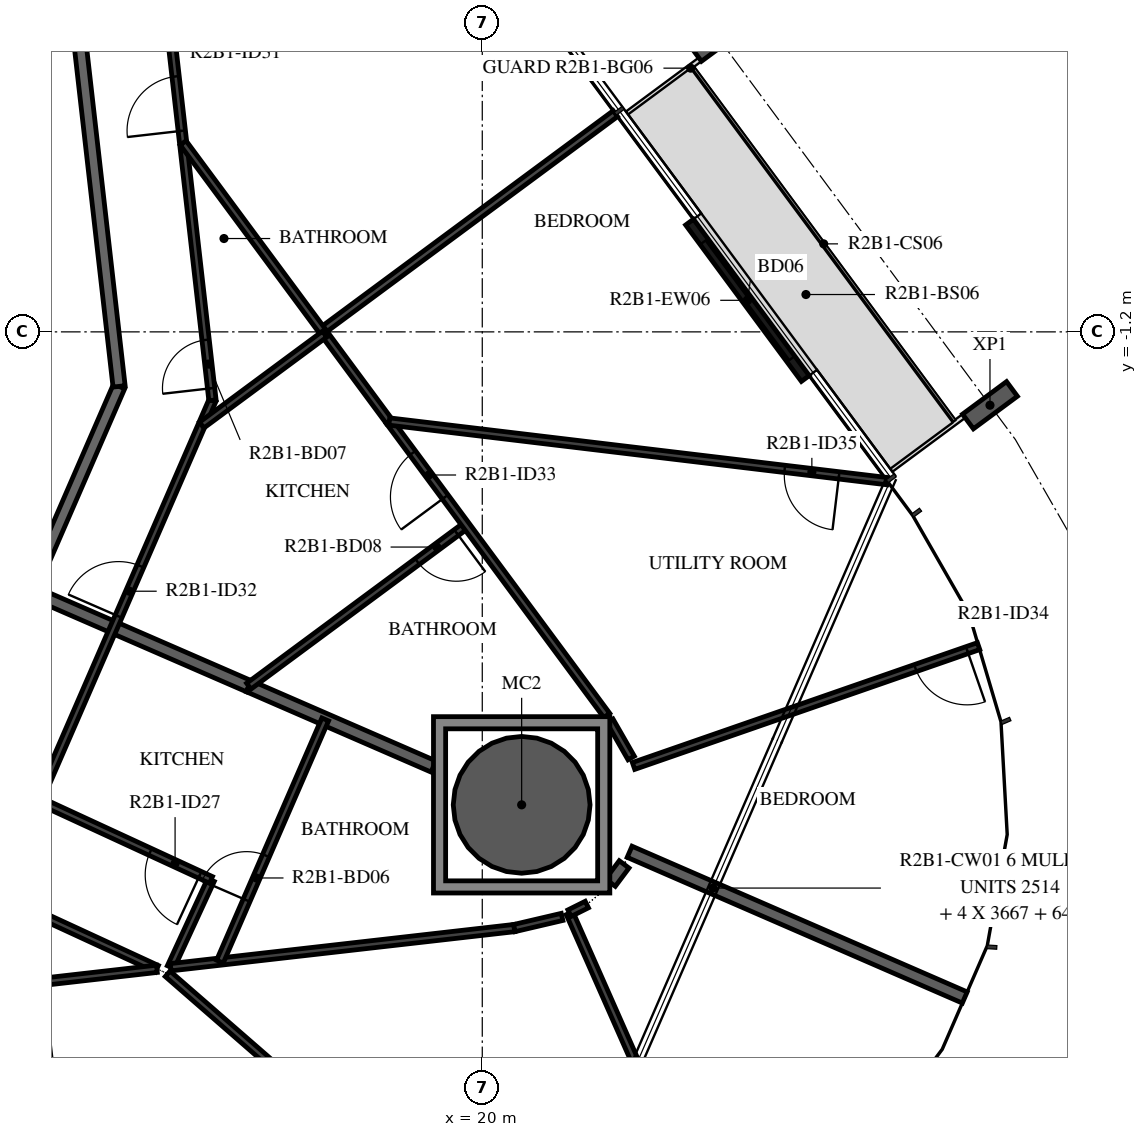
"""IFC4 building model, lengths in metres.
Left out: names, types, materials, properties, quantities, classifications, styles, units other than length and angle.
Written with IfcOpenShell. Run it as: python <this file> out.ifc"""

import sys

from ifc_helpers import new_model, si_unit, direction, frame, frame_2d, origin, origin_2d, place, context, subcontext, project, spatial, polyline, rectangle, hollow_circle, i_section, outline, extrude, element, fill, save


model = new_model("IFC4")
c1 = context("Model", 3, precision=1e-05, world=origin(), true_north=direction((0.0, 1.0)))
c2 = subcontext(c1, "Body", "Model", "MODEL_VIEW")
j1 = project(units=[si_unit("LENGTHUNIT", "METRE"), si_unit("PLANEANGLEUNIT", "RADIAN")], contexts=[c1])
p1 = place(None, origin())
s1 = spatial("IfcSite", under=j1, at=p1, CompositionType="ELEMENT")
p2 = place(p1, origin())
s2 = spatial("IfcBuilding", under=s1, at=p2, CompositionType="ELEMENT")
p3 = place(p2, frame((0.0, 0.0, 87.2)))
s3 = spatial("IfcBuildingStorey", under=s2, at=p3, CompositionType="ELEMENT", Elevation=87.2)
p4 = place(p3, frame((20.648, -8.978, -0.38), z_axis=(0.0, 0.0, 1.0), x_axis=(1.0, 0.0, 0.0)))
e1 = element("IfcColumn", 1, at=p4, inside=s3, PredefinedType="COLUMN", context=c2, shape_type="SweptSolid", body=[
    extrude(hollow_circle(Radius=1.125, WallThickness=0.055, at=origin_2d()), origin(), (0.0, 0.0, 1.0), 3.5),
])
for number, where, z_axis, x_axis in (
    (2, (28.349, -2.406, -0.38), (0.0, 0.0, 1.0), (0.595, -0.804, 0.0)),
    (3, (23.877, 3.638, -0.38), (0.0, 0.0, 1.0), (0.595, -0.804, 0.0)),
):
    element("IfcColumn", number, at=place(p3, frame(where, z_axis=z_axis, x_axis=x_axis)), inside=s3, PredefinedType="COLUMN", context=c2, shape_type="SweptSolid", body=[
        extrude(i_section(OverallWidth=0.3, OverallDepth=0.9, WebThickness=0.019, FlangeThickness=0.035, FilletRadius=0.03, at=origin_2d()), origin(), (0.0, 0.0, 1.0), 3.5),
    ])
p5 = place(p3, frame((25.312, -1.967, 0.0), z_axis=(0.0, 0.0, 1.0), x_axis=(-0.594860752536, 0.803828766027, 0.0)))
e4 = element("IfcWall", 4, at=p5, inside=s3, PredefinedType="STANDARD", context=c2, shape_type="SweptSolid", body=[
    extrude(rectangle(XDim=3.2, YDim=0.16, at=frame_2d((1.6, 0.0))), origin(), (0.0, 0.0, 1.0), 3.12),
])
p6 = place(p5, frame((0.4, 0.0, 0.0)))
e5 = element("IfcOpeningElement", 5, at=p6, cuts=e4, PredefinedType="OPENING", context=c2, shape_type="SweptSolid", body=[
    extrude(rectangle(XDim=2.4, YDim=2.4, at=frame_2d((1.2, 1.2))), frame((0.0, 0.09, 0.0), z_axis=(0.0, -1.0, 0.0), x_axis=(1.0, 0.0, 0.0)), (0.0, 0.0, 1.0), 0.18),
])
p7 = place(p3, frame((11.1, -8.829, 0.0), z_axis=(0.0, 0.0, 1.0), x_axis=(0.398741918631, 0.917063183388, 0.0)))
e6 = element("IfcWall", 6, at=p7, inside=s3, PredefinedType="STANDARD", context=c2, shape_type="SweptSolid", body=[
    extrude(rectangle(XDim=7.342, YDim=0.2, at=frame_2d((3.671, 0.0))), origin(), (0.0, 0.0, 1.0), 3.12),
])
p8 = place(p3, frame((14.028, -2.096, 0.0), z_axis=(0.0, 0.0, 1.0), x_axis=(-0.113207047924, 0.993571418822, 0.0)))
e7 = element("IfcWall", 7, at=p8, inside=s3, PredefinedType="STANDARD", context=c2, shape_type="SweptSolid", body=[
    extrude(rectangle(XDim=7.24, YDim=0.2, at=frame_2d((3.62, 0.0))), origin(), (0.0, 0.0, 1.0), 3.12),
])
p9 = place(p8, frame((6.04, 0.0, 0.0)))
e8 = element("IfcOpeningElement", 8, at=p9, cuts=e7, PredefinedType="OPENING", context=c2, shape_type="SweptSolid", body=[
    extrude(rectangle(XDim=1.0, YDim=2.1, at=frame_2d((0.5, 1.05))), frame((0.0, 0.11, 0.0), z_axis=(0.0, -1.0, 0.0), x_axis=(1.0, 0.0, 0.0)), (0.0, 0.0, 1.0), 0.22),
])
p10 = place(p3, frame((16.16, -7.027, 0.0), z_axis=(0.0, 0.0, 1.0), x_axis=(-0.917065107526, 0.398737493293, 0.0)))
e9 = element("IfcWall", 9, at=p10, inside=s3, PredefinedType="STANDARD", context=c2, shape_type="SweptSolid", body=[
    extrude(rectangle(XDim=3.922, YDim=0.2, at=frame_2d((1.961, 0.0))), origin(), (0.0, 0.0, 1.0), 3.12),
])
p11 = place(p3, frame((19.198, -8.347, 0.0), z_axis=(0.0, 0.0, 1.0), x_axis=(-0.917046616943, 0.398780017495, 0.0)))
e10 = element("IfcWall", 10, at=p11, inside=s3, PredefinedType="STANDARD", context=c2, shape_type="SweptSolid", body=[
    extrude(rectangle(XDim=3.312, YDim=0.2, at=frame_2d((1.656, 0.0))), origin(), (0.0, 0.0, 1.0), 3.12),
])
p12 = place(p3, frame((27.935, -12.146, 0.0), z_axis=(0.0, 0.0, 1.0), x_axis=(-0.917058430913, 0.398752848631, 0.0)))
e11 = element("IfcWall", 11, at=p12, inside=s3, PredefinedType="STANDARD", context=c2, shape_type="SweptSolid", body=[
    extrude(rectangle(XDim=6.01, YDim=0.2, at=frame_2d((3.005, 0.0))), origin(), (0.0, 0.0, 1.0), 3.12),
])
p13 = place(p3, frame((22.333, -9.957, 0.0), z_axis=(0.0, 0.0, 1.0), x_axis=(-0.599479717237, -0.800389947851, 0.0)))
e12 = element("IfcWall", 12, at=p13, inside=s3, PredefinedType="STANDARD", context=c2, shape_type="SweptSolid", body=[
    extrude(rectangle(XDim=0.375, YDim=0.2, at=frame_2d((0.188, 0.0))), origin(), (0.0, 0.0, 1.0), 3.12),
])
p14 = place(p3, frame((11.649, -10.289, 0.0), z_axis=(0.0, 0.0, 1.0), x_axis=(0.9079269461, -0.419128453514, 0.0)))
e13 = element("IfcWall", 13, at=p14, inside=s3, PredefinedType="PARTITIONING", context=c2, shape_type="SweptSolid", body=[
    extrude(rectangle(XDim=3.304, YDim=0.12, at=frame_2d((1.652, 0.0))), origin(), (0.0, 0.0, 1.0), 3.12),
])
p15 = place(p3, frame((14.875, -11.648, 0.0), z_axis=(0.0, 0.0, 1.0), x_axis=(0.419087543301, 0.90794583046, 0.0)))
e14 = element("IfcWall", 14, at=p15, inside=s3, PredefinedType="PARTITIONING", context=c2, shape_type="SweptSolid", body=[
    extrude(rectangle(XDim=1.582, YDim=0.12, at=frame_2d((0.791, 0.0))), origin(), (0.0, 0.0, 1.0), 3.12),
])
p16 = place(p3, frame((15.538, -10.212, 0.0), z_axis=(0.0, 0.0, 1.0), x_axis=(-0.907941075756, 0.419097844131, 0.0)))
e15 = element("IfcWall", 15, at=p16, inside=s3, PredefinedType="PARTITIONING", context=c2, shape_type="SweptSolid", body=[
    extrude(rectangle(XDim=3.122, YDim=0.12, at=frame_2d((1.561, 0.0))), origin(), (0.0, 0.0, 1.0), 3.12),
])
p17 = place(p16, frame((0.2, 0.0, 0.0)))
e16 = element("IfcOpeningElement", 16, at=p17, cuts=e15, PredefinedType="OPENING", context=c2, shape_type="SweptSolid", body=[
    extrude(rectangle(XDim=0.9, YDim=2.1, at=frame_2d((0.45, 1.05))), frame((0.0, 0.07, 0.0), z_axis=(0.0, -1.0, 0.0), x_axis=(1.0, 0.0, 0.0)), (0.0, 0.0, 1.0), 0.14),
])
p18 = place(p3, frame((12.703, -8.904, 0.0), z_axis=(0.0, 0.0, 1.0), x_axis=(0.398716154453, 0.917074385303, 0.0)))
e17 = element("IfcWall", 17, at=p18, inside=s3, PredefinedType="PARTITIONING", context=c2, shape_type="SweptSolid", body=[
    extrude(rectangle(XDim=7.173, YDim=0.12, at=frame_2d((3.586, 0.0))), origin(), (0.0, 0.0, 1.0), 3.12),
])
p19 = place(p18, frame((3.3, 0.0, 0.0)))
e18 = element("IfcOpeningElement", 18, at=p19, cuts=e17, PredefinedType="OPENING", context=c2, shape_type="SweptSolid", body=[
    extrude(rectangle(XDim=0.9, YDim=2.1, at=frame_2d((0.45, 1.05))), frame((0.0, 0.07, 0.0), z_axis=(0.0, -1.0, 0.0), x_axis=(1.0, 0.0, 0.0)), (0.0, 0.0, 1.0), 0.14),
])
p20 = place(p3, frame((14.649, -11.674, 0.0), z_axis=(0.0, 0.0, 1.0), x_axis=(-0.993573746873, -0.113186613721, 0.0)))
e19 = element("IfcWall", 19, at=p20, inside=s3, PredefinedType="PARTITIONING", context=c2, shape_type="SweptSolid", body=[
    extrude(rectangle(XDim=5.796, YDim=0.12, at=frame_2d((2.898, 0.0))), origin(), (0.0, 0.0, 1.0), 3.12),
])
p21 = place(p3, frame((13.386, -17.857, 0.0), z_axis=(0.0, 0.0, 1.0), x_axis=(-0.113200012983, 0.993572220355, 0.0)))
e20 = element("IfcWall", 20, at=p21, inside=s3, PredefinedType="PARTITIONING", context=c2, shape_type="SweptSolid", body=[
    extrude(rectangle(XDim=6.0, YDim=0.12, at=frame_2d((3.0, 0.0))), origin(), (0.0, 0.0, 1.0), 2.73),
])
p22 = place(p21, frame((0.2, 0.0, 0.0)))
e21 = element("IfcOpeningElement", 21, at=p22, cuts=e20, PredefinedType="OPENING", context=c2, shape_type="SweptSolid", body=[
    extrude(rectangle(XDim=0.9, YDim=2.1, at=frame_2d((0.45, 1.05))), frame((0.0, 0.07, 0.0), z_axis=(0.0, -1.0, 0.0), x_axis=(1.0, 0.0, 0.0)), (0.0, 0.0, 1.0), 0.14),
])
p23 = place(p3, frame((20.856, -17.006, 0.0), z_axis=(0.0, 0.0, 1.0), x_axis=(-0.75423134567, 0.656608770281, 0.0)))
e22 = element("IfcWall", 22, at=p23, inside=s3, PredefinedType="PARTITIONING", context=c2, shape_type="SweptSolid", body=[
    extrude(rectangle(XDim=7.995, YDim=0.12, at=frame_2d((3.998, 0.0))), origin(), (0.0, 0.0, 1.0), 3.12),
])
p24 = place(p23, frame((0.7, 0.0, 0.0)))
e23 = element("IfcOpeningElement", 23, at=p24, cuts=e22, PredefinedType="OPENING", context=c2, shape_type="SweptSolid", body=[
    extrude(rectangle(XDim=0.9, YDim=2.1, at=frame_2d((0.45, 1.05))), frame((0.0, 0.07, 0.0), z_axis=(0.0, -1.0, 0.0), x_axis=(1.0, 0.0, 0.0)), (0.0, 0.0, 1.0), 0.14),
])
p25 = place(p3, frame((20.527, -11.004, 0.0), z_axis=(0.0, 0.0, 1.0), x_axis=(-0.993568869194, -0.113229422712, 0.0)))
e24 = element("IfcWall", 24, at=p25, inside=s3, PredefinedType="PARTITIONING", context=c2, shape_type="SweptSolid", body=[
    extrude(rectangle(XDim=5.688, YDim=0.12, at=frame_2d((2.844, 0.0))), origin(), (0.0, 0.0, 1.0), 3.12),
])
p26 = place(p3, frame((21.312, -10.821, 0.0), z_axis=(0.0, 0.0, 1.0), x_axis=(-0.973765266404, -0.227554841621, 0.0)))
e25 = element("IfcWall", 25, at=p26, inside=s3, PredefinedType="PARTITIONING", context=c2, shape_type="SweptSolid", body=[
    extrude(rectangle(XDim=0.807, YDim=0.12, at=frame_2d((0.403, 0.0))), origin(), (0.0, 0.0, 1.0), 3.12),
])
p27 = place(p3, frame((23.864, -16.253, 0.0), z_axis=(0.0, 0.0, 1.0), x_axis=(-0.404274566917, 0.914637673915, 0.0)))
e26 = element("IfcWall", 26, at=p27, inside=s3, PredefinedType="PARTITIONING", context=c2, shape_type="SweptSolid", body=[
    extrude(rectangle(XDim=6.006, YDim=0.12, at=frame_2d((3.003, 0.0))), origin(), (0.0, 0.0, 1.0), 3.12),
])
p28 = place(p27, frame((0.2, 0.0, 0.0)))
e27 = element("IfcOpeningElement", 27, at=p28, cuts=e26, PredefinedType="OPENING", context=c2, shape_type="SweptSolid", body=[
    extrude(rectangle(XDim=0.9, YDim=2.1, at=frame_2d((0.45, 1.05))), frame((0.0, 0.07, 0.0), z_axis=(0.0, -1.0, 0.0), x_axis=(1.0, 0.0, 0.0)), (0.0, 0.0, 1.0), 0.14),
])
p29 = place(p3, frame((15.686, -11.556, 0.0), z_axis=(0.0, 0.0, 1.0), x_axis=(0.398724055903, 0.917070949951, 0.0)))
e28 = element("IfcWall", 28, at=p29, inside=s3, PredefinedType="PARTITIONING", context=c2, shape_type="SweptSolid", body=[
    extrude(rectangle(XDim=4.343, YDim=0.12, at=frame_2d((2.171, 0.0))), origin(), (0.0, 0.0, 1.0), 3.12),
])
p30 = place(p29, frame((1.1, 0.0, 0.0)))
e29 = element("IfcOpeningElement", 29, at=p30, cuts=e28, PredefinedType="OPENING", context=c2, shape_type="SweptSolid", body=[
    extrude(rectangle(XDim=0.8, YDim=2.1, at=frame_2d((0.4, 1.05))), frame((0.0, 0.07, 0.0), z_axis=(0.0, -1.0, 0.0), x_axis=(1.0, 0.0, 0.0)), (0.0, 0.0, 1.0), 0.14),
])
p31 = place(p3, frame((21.435, -10.76, 0.0), z_axis=(0.0, 0.0, 1.0), x_axis=(0.895041493646, 0.445982874841, 0.0)))
e30 = element("IfcWall", 30, at=p31, inside=s3, PredefinedType="PARTITIONING", context=c2, shape_type="SweptSolid", body=[
    extrude(rectangle(XDim=0.317, YDim=0.12, at=frame_2d((0.159, 0.0))), origin(), (0.0, 0.0, 1.0), 3.12),
])
p32 = place(p3, frame((15.563, -2.326, 0.0), z_axis=(0.0, 0.0, 1.0), x_axis=(-0.113209750844, 0.993571110849, 0.0)))
e31 = element("IfcWall", 31, at=p32, inside=s3, PredefinedType="PARTITIONING", context=c2, shape_type="SweptSolid", body=[
    extrude(rectangle(XDim=6.828, YDim=0.12, at=frame_2d((3.414, 0.0))), origin(), (0.0, 0.0, 1.0), 3.12),
])
p33 = place(p32, frame((4.461, 0.0, 0.0)))
e32 = element("IfcOpeningElement", 32, at=p33, cuts=e31, PredefinedType="OPENING", context=c2, shape_type="SweptSolid", body=[
    extrude(rectangle(XDim=0.9, YDim=2.1, at=frame_2d((0.45, 1.05))), frame((0.0, 0.07, 0.0), z_axis=(0.0, -1.0, 0.0), x_axis=(1.0, 0.0, 0.0)), (0.0, 0.0, 1.0), 0.14),
])
p34 = place(p32, frame((0.2, 0.0, 0.0)))
e33 = element("IfcOpeningElement", 33, at=p34, cuts=e31, PredefinedType="OPENING", context=c2, shape_type="SweptSolid", body=[
    extrude(rectangle(XDim=0.8, YDim=2.1, at=frame_2d((0.4, 1.05))), frame((0.0, 0.07, 0.0), z_axis=(0.0, -1.0, 0.0), x_axis=(1.0, 0.0, 0.0)), (0.0, 0.0, 1.0), 0.14),
])
p35 = place(p3, frame((17.366, -1.18, 0.0), z_axis=(0.0, 0.0, 1.0), x_axis=(0.803855518832, 0.594824600065, 0.0)))
e34 = element("IfcWall", 34, at=p35, inside=s3, PredefinedType="PARTITIONING", context=c2, shape_type="SweptSolid", body=[
    extrude(rectangle(XDim=6.0, YDim=0.12, at=frame_2d((3.0, 0.0))), origin(), (0.0, 0.0, 1.0), 2.73),
])
p36 = place(p3, frame((15.081, 1.907, 0.0), z_axis=(0.0, 0.0, 1.0), x_axis=(0.594819754849, -0.803859104098, 0.0)))
e35 = element("IfcWall", 35, at=p36, inside=s3, PredefinedType="PARTITIONING", context=c2, shape_type="SweptSolid", body=[
    extrude(rectangle(XDim=5.699, YDim=0.12, at=frame_2d((2.85, 0.0))), origin(), (0.0, 0.0, 1.0), 3.12),
])
p37 = place(p3, frame((28.162, -6.368, 0.0), z_axis=(0.0, 0.0, 1.0), x_axis=(-0.944645847702, -0.328091789624, 0.0)))
e36 = element("IfcWall", 36, at=p37, inside=s3, PredefinedType="PARTITIONING", context=c2, shape_type="SweptSolid", body=[
    extrude(rectangle(XDim=6.007, YDim=0.12, at=frame_2d((3.003, 0.0))), origin(), (0.0, 0.0, 1.0), 3.12),
])
p38 = place(p37, frame((0.2, 0.0, 0.0)))
e37 = element("IfcOpeningElement", 37, at=p38, cuts=e36, PredefinedType="OPENING", context=c2, shape_type="SweptSolid", body=[
    extrude(rectangle(XDim=0.9, YDim=2.1, at=frame_2d((0.45, 1.05))), frame((0.0, 0.07, 0.0), z_axis=(0.0, -1.0, 0.0), x_axis=(1.0, 0.0, 0.0)), (0.0, 0.0, 1.0), 0.14),
])
p39 = place(p3, frame((22.449, -8.207, 0.0), z_axis=(0.0, 0.0, 1.0), x_axis=(-0.497404938529, 0.867518488061, 0.0)))
e38 = element("IfcWall", 38, at=p39, inside=s3, PredefinedType="PARTITIONING", context=c2, shape_type="SweptSolid", body=[
    extrude(rectangle(XDim=0.706, YDim=0.12, at=frame_2d((0.353, 0.0))), origin(), (0.0, 0.0, 1.0), 3.12),
])
p40 = place(p3, frame((19.735, -4.382, 0.0), z_axis=(0.0, 0.0, 1.0), x_axis=(-0.803850825108, -0.594830943188, 0.0)))
e39 = element("IfcWall", 39, at=p40, inside=s3, PredefinedType="PARTITIONING", context=c2, shape_type="SweptSolid", body=[
    extrude(rectangle(XDim=4.447, YDim=0.12, at=frame_2d((2.223, 0.0))), origin(), (0.0, 0.0, 1.0), 3.12),
])
p41 = place(p40, frame((0.2, 0.0, 0.0)))
e40 = element("IfcOpeningElement", 40, at=p41, cuts=e39, PredefinedType="OPENING", context=c2, shape_type="SweptSolid", body=[
    extrude(rectangle(XDim=0.8, YDim=2.1, at=frame_2d((0.4, 1.05))), frame((0.0, 0.07, 0.0), z_axis=(0.0, -1.0, 0.0), x_axis=(1.0, 0.0, 0.0)), (0.0, 0.0, 1.0), 0.14),
])
p42 = place(p3, frame((22.048, -7.507, 0.0), z_axis=(0.0, 0.0, 1.0), x_axis=(-0.59484195588, 0.803842675855, 0.0)))
e41 = element("IfcWall", 41, at=p42, inside=s3, PredefinedType="PARTITIONING", context=c2, shape_type="SweptSolid", body=[
    extrude(rectangle(XDim=6.012, YDim=0.12, at=frame_2d((3.006, 0.0))), origin(), (0.0, 0.0, 1.0), 3.12),
])
p43 = place(p42, frame((4.469, 0.0, 0.0)))
e42 = element("IfcOpeningElement", 42, at=p43, cuts=e41, PredefinedType="OPENING", context=c2, shape_type="SweptSolid", body=[
    extrude(rectangle(XDim=0.9, YDim=2.1, at=frame_2d((0.45, 1.05))), frame((0.0, 0.07, 0.0), z_axis=(0.0, -1.0, 0.0), x_axis=(1.0, 0.0, 0.0)), (0.0, 0.0, 1.0), 0.14),
])
p44 = place(p3, frame((17.408, -1.237, 0.0), z_axis=(0.0, 0.0, 1.0), x_axis=(-0.803863255433, -0.594814144556, 0.0)))
e43 = element("IfcWall", 43, at=p44, inside=s3, PredefinedType="PARTITIONING", context=c2, shape_type="SweptSolid", body=[
    extrude(rectangle(XDim=2.514, YDim=0.12, at=frame_2d((1.257, 0.0))), origin(), (0.0, 0.0, 1.0), 3.12),
])
p45 = place(p3, frame((26.661, -3.655, 0.0), z_axis=(0.0, 0.0, 1.0), x_axis=(-0.992903144553, 0.11892579845, 0.0)))
e44 = element("IfcWall", 44, at=p45, inside=s3, PredefinedType="PARTITIONING", context=c2, shape_type="SweptSolid", body=[
    extrude(rectangle(XDim=8.249, YDim=0.12, at=frame_2d((4.124, 0.0))), origin(), (0.0, 0.0, 1.0), 3.12),
])
p46 = place(p45, frame((0.8, 0.0, 0.0)))
e45 = element("IfcOpeningElement", 45, at=p46, cuts=e44, PredefinedType="OPENING", context=c2, shape_type="SweptSolid", body=[
    extrude(rectangle(XDim=0.9, YDim=2.1, at=frame_2d((0.45, 1.05))), frame((0.0, 0.07, 0.0), z_axis=(0.0, -1.0, 0.0), x_axis=(1.0, 0.0, 0.0)), (0.0, 0.0, 1.0), 0.14),
])
p47 = place(p3, origin())
e46 = element("IfcWall", 46, at=p47, inside=s3, PredefinedType="STANDARD", context=c2, shape_type="SweptSolid", body=[
    extrude(outline(polyline([(22.098, -7.528), (22.098, -10.428), (19.198, -10.428), (19.198, -7.528), (22.098, -7.528)]), holes=[polyline([(19.398, -10.228), (21.898, -10.228), (21.898, -7.728), (19.398, -7.728), (19.398, -10.228)])]), origin(), (0.0, 0.0, 1.0), 3.12),
])
p48 = place(p6, origin())
e47 = element("IfcDoor", 47, at=p48, inside=s3, OperationType="DOUBLE_DOOR_SLIDING", PredefinedType="DOOR", context=c2, shape_type="SweptSolid", body=[
    extrude(rectangle(XDim=2.4, YDim=2.4, at=frame_2d((1.2, 1.2))), frame((0.0, 0.025, 0.0), z_axis=(0.0, -1.0, 0.0), x_axis=(1.0, 0.0, 0.0)), (0.0, 0.0, 1.0), 0.05),
])
fill(e5, e47)
p49 = place(p17, origin())
e48 = element("IfcDoor", 48, at=p49, inside=s3, OperationType="SINGLE_SWING_LEFT", PredefinedType="DOOR", context=c2, shape_type="SweptSolid", body=[
    extrude(rectangle(XDim=0.9, YDim=2.1, at=frame_2d((0.45, 1.05))), frame((0.0, 0.025, 0.0), z_axis=(0.0, -1.0, 0.0), x_axis=(1.0, 0.0, 0.0)), (0.0, 0.0, 1.0), 0.05),
])
fill(e16, e48)
p50 = place(p30, origin())
e49 = element("IfcDoor", 49, at=p50, inside=s3, OperationType="SINGLE_SWING_RIGHT", PredefinedType="DOOR", context=c2, shape_type="SweptSolid", body=[
    extrude(rectangle(XDim=0.8, YDim=2.1, at=frame_2d((0.4, 1.05))), frame((0.0, 0.025, 0.0), z_axis=(0.0, -1.0, 0.0), x_axis=(1.0, 0.0, 0.0)), (0.0, 0.0, 1.0), 0.05),
])
fill(e29, e49)
p51 = place(p33, origin())
e50 = element("IfcDoor", 50, at=p51, inside=s3, OperationType="SINGLE_SWING_LEFT", PredefinedType="DOOR", context=c2, shape_type="SweptSolid", body=[
    extrude(rectangle(XDim=0.9, YDim=2.1, at=frame_2d((0.45, 1.05))), frame((0.0, 0.025, 0.0), z_axis=(0.0, -1.0, 0.0), x_axis=(1.0, 0.0, 0.0)), (0.0, 0.0, 1.0), 0.05),
])
fill(e32, e50)
p52 = place(p19, origin())
e51 = element("IfcDoor", 51, at=p52, inside=s3, OperationType="SINGLE_SWING_RIGHT", PredefinedType="DOOR", context=c2, shape_type="SweptSolid", body=[
    extrude(rectangle(XDim=0.9, YDim=2.1, at=frame_2d((0.45, 1.05))), frame((0.0, 0.025, 0.0), z_axis=(0.0, -1.0, 0.0), x_axis=(1.0, 0.0, 0.0)), (0.0, 0.0, 1.0), 0.05),
])
fill(e18, e51)
p53 = place(p34, origin())
e52 = element("IfcDoor", 52, at=p53, inside=s3, OperationType="SINGLE_SWING_LEFT", PredefinedType="DOOR", context=c2, shape_type="SweptSolid", body=[
    extrude(rectangle(XDim=0.8, YDim=2.1, at=frame_2d((0.4, 1.05))), frame((0.0, 0.025, 0.0), z_axis=(0.0, -1.0, 0.0), x_axis=(1.0, 0.0, 0.0)), (0.0, 0.0, 1.0), 0.05),
])
fill(e33, e52)
p54 = place(p41, origin())
e53 = element("IfcDoor", 53, at=p54, inside=s3, OperationType="SINGLE_SWING_LEFT", PredefinedType="DOOR", context=c2, shape_type="SweptSolid", body=[
    extrude(rectangle(XDim=0.8, YDim=2.1, at=frame_2d((0.4, 1.05))), frame((0.0, 0.025, 0.0), z_axis=(0.0, -1.0, 0.0), x_axis=(1.0, 0.0, 0.0)), (0.0, 0.0, 1.0), 0.05),
])
fill(e40, e53)
p55 = place(p43, origin())
e54 = element("IfcDoor", 54, at=p55, inside=s3, OperationType="SINGLE_SWING_LEFT", PredefinedType="DOOR", context=c2, shape_type="SweptSolid", body=[
    extrude(rectangle(XDim=0.9, YDim=2.1, at=frame_2d((0.45, 1.05))), frame((0.0, 0.025, 0.0), z_axis=(0.0, -1.0, 0.0), x_axis=(1.0, 0.0, 0.0)), (0.0, 0.0, 1.0), 0.05),
])
fill(e42, e54)
p56 = place(p38, origin())
e55 = element("IfcDoor", 55, at=p56, inside=s3, OperationType="SINGLE_SWING_LEFT", PredefinedType="DOOR", context=c2, shape_type="SweptSolid", body=[
    extrude(rectangle(XDim=0.9, YDim=2.1, at=frame_2d((0.45, 1.05))), frame((0.0, 0.025, 0.0), z_axis=(0.0, -1.0, 0.0), x_axis=(1.0, 0.0, 0.0)), (0.0, 0.0, 1.0), 0.05),
])
fill(e37, e55)
p57 = place(p46, origin())
e56 = element("IfcDoor", 56, at=p57, inside=s3, OperationType="SINGLE_SWING_RIGHT", PredefinedType="DOOR", context=c2, shape_type="SweptSolid", body=[
    extrude(rectangle(XDim=0.9, YDim=2.1, at=frame_2d((0.45, 1.05))), frame((0.0, 0.025, 0.0), z_axis=(0.0, -1.0, 0.0), x_axis=(1.0, 0.0, 0.0)), (0.0, 0.0, 1.0), 0.05),
])
fill(e45, e56)
save(model, sys.argv[1])
